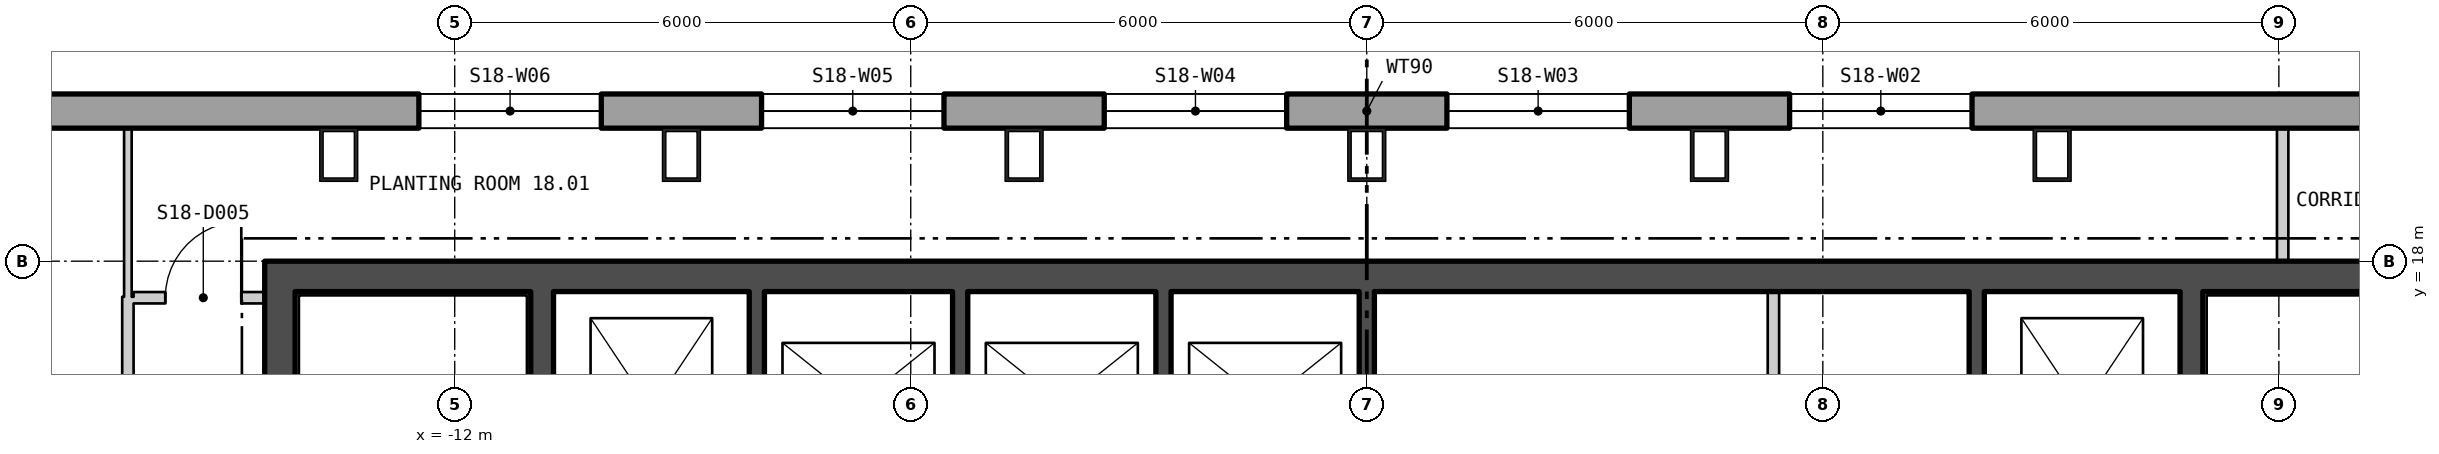
"""IFC4 building model, lengths in metres.
Left out: names, types, materials, properties, quantities, classifications, styles, units other than length and angle.
Written with IfcOpenShell. Run it as: python <this file> out.ifc"""

import sys

from ifc_helpers import new_model, si_unit, direction, frame, frame_2d, origin, origin_2d, place, context, subcontext, project, spatial, polyline, rectangle, hollow_rectangle, outline, extrude, element, fill, save


model = new_model("IFC4")
c1 = context("Model", 3, precision=1e-05, world=origin(), true_north=direction((0.0, 1.0)))
c2 = subcontext(c1, "Body", "Model", "MODEL_VIEW")
j1 = project(units=[si_unit("LENGTHUNIT", "METRE"), si_unit("PLANEANGLEUNIT", "RADIAN")], contexts=[c1])
p1 = place(None, origin())
s1 = spatial("IfcSite", under=j1, at=p1, CompositionType="ELEMENT")
p2 = place(p1, origin())
s2 = spatial("IfcBuilding", under=s1, at=p2, CompositionType="ELEMENT")
p3 = place(p2, frame((0.0, 0.0, 245.4)))
s3 = spatial("IfcBuildingStorey", under=s2, at=p3, CompositionType="ELEMENT", Elevation=245.4)
for number, where, z_axis, x_axis in (
    (1, (9.017, 19.4, 0.0), (0.0, 0.0, 1.0), (-1.0, 0.0, 0.0)),
    (2, (4.509, 19.4, 0.0), (0.0, 0.0, 1.0), (-1.0, 0.0, 0.0)),
    (3, (0.0, 19.4, 0.0), (0.0, 0.0, 1.0), (-1.0, 0.0, 0.0)),
    (4, (-4.509, 19.4, 0.0), (0.0, 0.0, 1.0), (-1.0, 0.0, 0.0)),
    (5, (-9.017, 19.4, 0.0), (0.0, 0.0, 1.0), (-1.0, 0.0, 0.0)),
    (6, (-13.526, 19.4, 0.0), (0.0, 0.0, 1.0), (-1.0, 0.0, 0.0)),
):
    element("IfcColumn", number, at=place(p3, frame(where, z_axis=z_axis, x_axis=x_axis)), inside=s3, PredefinedType="COLUMN", context=c2, shape_type="SweptSolid", body=[
        extrude(hollow_rectangle(XDim=0.5, YDim=0.7, WallThickness=0.045, at=origin_2d()), origin(), (0.0, 0.0, 1.0), 3.9),
    ])
p4 = place(p3, frame((22.875, 19.975, -0.4), z_axis=(0.0, 0.0, 1.0), x_axis=(-1.0, 0.0, 0.0)))
e7 = element("IfcWall", 7, at=p4, inside=s3, PredefinedType="SOLIDWALL", context=c2, shape_type="SweptSolid", body=[
    extrude(outline(polyline([(-0.13, -0.225), (45.88, -0.225), (45.62, 0.225), (0.13, 0.225), (-0.13, -0.225)])), origin(), (0.0, 0.0, 1.0), 3.9),
])
p5 = place(p4, frame((1.425, 0.0, 1.3)))
e8 = element("IfcOpeningElement", 8, at=p5, cuts=e7, PredefinedType="OPENING", context=c2, shape_type="SweptSolid", body=[
    extrude(rectangle(XDim=2.4, YDim=2.0, at=frame_2d((1.2, 1.0))), frame((0.0, 0.235, 0.0), z_axis=(0.0, -1.0, 0.0), x_axis=(1.0, 0.0, 0.0)), (0.0, 0.0, 1.0), 0.47),
])
p6 = place(p4, frame((14.912, 0.0, 1.3)))
e9 = element("IfcOpeningElement", 9, at=p6, cuts=e7, PredefinedType="OPENING", context=c2, shape_type="SweptSolid", body=[
    extrude(rectangle(XDim=2.4, YDim=2.0, at=frame_2d((1.2, 1.0))), frame((0.0, 0.235, 0.0), z_axis=(0.0, -1.0, 0.0), x_axis=(1.0, 0.0, 0.0)), (0.0, 0.0, 1.0), 0.47),
])
p7 = place(p4, frame((19.421, 0.0, 1.3)))
e10 = element("IfcOpeningElement", 10, at=p7, cuts=e7, PredefinedType="OPENING", context=c2, shape_type="SweptSolid", body=[
    extrude(rectangle(XDim=2.4, YDim=2.0, at=frame_2d((1.2, 1.0))), frame((0.0, 0.235, 0.0), z_axis=(0.0, -1.0, 0.0), x_axis=(1.0, 0.0, 0.0)), (0.0, 0.0, 1.0), 0.47),
])
p8 = place(p4, frame((23.929, 0.0, 1.3)))
e11 = element("IfcOpeningElement", 11, at=p8, cuts=e7, PredefinedType="OPENING", context=c2, shape_type="SweptSolid", body=[
    extrude(rectangle(XDim=2.4, YDim=2.0, at=frame_2d((1.2, 1.0))), frame((0.0, 0.235, 0.0), z_axis=(0.0, -1.0, 0.0), x_axis=(1.0, 0.0, 0.0)), (0.0, 0.0, 1.0), 0.47),
])
p9 = place(p4, frame((28.438, 0.0, 1.3)))
e12 = element("IfcOpeningElement", 12, at=p9, cuts=e7, PredefinedType="OPENING", context=c2, shape_type="SweptSolid", body=[
    extrude(rectangle(XDim=2.4, YDim=2.0, at=frame_2d((1.2, 1.0))), frame((0.0, 0.235, 0.0), z_axis=(0.0, -1.0, 0.0), x_axis=(1.0, 0.0, 0.0)), (0.0, 0.0, 1.0), 0.47),
])
p10 = place(p4, frame((32.947, 0.0, 1.3)))
e13 = element("IfcOpeningElement", 13, at=p10, cuts=e7, PredefinedType="OPENING", context=c2, shape_type="SweptSolid", body=[
    extrude(rectangle(XDim=2.4, YDim=2.0, at=frame_2d((1.2, 1.0))), frame((0.0, 0.235, 0.0), z_axis=(0.0, -1.0, 0.0), x_axis=(1.0, 0.0, 0.0)), (0.0, 0.0, 1.0), 0.47),
])
p11 = place(p4, frame((41.925, 0.0, 1.3)))
e14 = element("IfcOpeningElement", 14, at=p11, cuts=e7, PredefinedType="OPENING", context=c2, shape_type="SweptSolid", body=[
    extrude(rectangle(XDim=2.4, YDim=2.0, at=frame_2d((1.2, 1.0))), frame((0.0, 0.235, 0.0), z_axis=(0.0, -1.0, 0.0), x_axis=(1.0, 0.0, 0.0)), (0.0, 0.0, 1.0), 0.47),
])
p12 = place(p3, frame((-14.5, 17.8, 0.0), z_axis=(0.0, 0.0, 1.0), x_axis=(1.0, 0.0, 0.0)))
e15 = element("IfcWall", 15, at=p12, inside=s3, PredefinedType="SHEAR", context=c2, shape_type="SweptSolid", body=[
    extrude(rectangle(XDim=29.0, YDim=0.4, at=frame_2d((14.5, 0.0))), origin(), (0.0, 0.0, 1.0), 3.7),
])
p13 = place(p3, frame((-14.3, 4.4, 0.0), z_axis=(0.0, 0.0, 1.0), x_axis=(0.0, 1.0, 0.0)))
e16 = element("IfcWall", 16, at=p13, inside=s3, PredefinedType="SHEAR", context=c2, shape_type="SweptSolid", body=[
    extrude(rectangle(XDim=13.2, YDim=0.4, at=frame_2d((6.6, 0.0))), origin(), (0.0, 0.0, 1.0), 3.7),
])
p14 = place(p13, frame((3.05, 0.0, 0.0)))
e17 = element("IfcOpeningElement", 17, at=p14, cuts=e16, PredefinedType="OPENING", context=c2, shape_type="SweptSolid", body=[
    extrude(rectangle(XDim=1.5, YDim=2.1, at=frame_2d((0.75, 1.05))), frame((0.0, 0.21, 0.0), z_axis=(0.0, -1.0, 0.0), x_axis=(1.0, 0.0, 0.0)), (0.0, 0.0, 1.0), 0.42),
])
p15 = place(p3, frame((-10.85, 4.4, 0.0), z_axis=(0.0, 0.0, 1.0), x_axis=(0.0, 1.0, 0.0)))
e18 = element("IfcWall", 18, at=p15, inside=s3, PredefinedType="SHEAR", context=c2, shape_type="SweptSolid", body=[
    extrude(rectangle(XDim=13.2, YDim=0.3, at=frame_2d((6.6, 0.0))), origin(), (0.0, 0.0, 1.0), 3.7),
])
p16 = place(p15, frame((1.575, 0.0, 0.0)))
e19 = element("IfcOpeningElement", 19, at=p16, cuts=e18, PredefinedType="OPENING", context=c2, shape_type="SweptSolid", body=[
    extrude(rectangle(XDim=1.25, YDim=2.1, at=frame_2d((0.625, 1.05))), frame((0.0, 0.16, 0.0), z_axis=(0.0, -1.0, 0.0), x_axis=(1.0, 0.0, 0.0)), (0.0, 0.0, 1.0), 0.32),
])
p17 = place(p15, frame((0.4, 0.0, 0.0)))
e20 = element("IfcOpeningElement", 20, at=p17, cuts=e18, PredefinedType="OPENING", context=c2, shape_type="SweptSolid", body=[
    extrude(rectangle(XDim=0.9, YDim=2.1, at=frame_2d((0.45, 1.05))), frame((0.0, 0.16, 0.0), z_axis=(0.0, -1.0, 0.0), x_axis=(1.0, 0.0, 0.0)), (0.0, 0.0, 1.0), 0.32),
])
p18 = place(p3, frame((10.85, 4.4, 0.0), z_axis=(0.0, 0.0, 1.0), x_axis=(0.0, 1.0, 0.0)))
e21 = element("IfcWall", 21, at=p18, inside=s3, PredefinedType="SHEAR", context=c2, shape_type="SweptSolid", body=[
    extrude(rectangle(XDim=13.2, YDim=0.3, at=frame_2d((6.6, 0.0))), origin(), (0.0, 0.0, 1.0), 3.7),
])
p19 = place(p18, frame((1.575, 0.0, 0.0)))
e22 = element("IfcOpeningElement", 22, at=p19, cuts=e21, PredefinedType="OPENING", context=c2, shape_type="SweptSolid", body=[
    extrude(rectangle(XDim=1.25, YDim=2.1, at=frame_2d((0.625, 1.05))), frame((0.0, 0.16, 0.0), z_axis=(0.0, -1.0, 0.0), x_axis=(1.0, 0.0, 0.0)), (0.0, 0.0, 1.0), 0.32),
])
p20 = place(p18, frame((0.4, 0.0, 0.0)))
e23 = element("IfcOpeningElement", 23, at=p20, cuts=e21, PredefinedType="OPENING", context=c2, shape_type="SweptSolid", body=[
    extrude(rectangle(XDim=0.9, YDim=2.1, at=frame_2d((0.45, 1.05))), frame((0.0, 0.16, 0.0), z_axis=(0.0, -1.0, 0.0), x_axis=(1.0, 0.0, 0.0)), (0.0, 0.0, 1.0), 0.32),
])
for number, where, z_axis, x_axis in (
    (24, (-8.025, 14.7, 0.0), (0.0, 0.0, 1.0), (0.0, 1.0, 0.0)),
    (25, (-5.35, 14.7, 0.0), (0.0, 0.0, 1.0), (0.0, 1.0, 0.0)),
    (26, (-2.675, 14.7, 0.0), (0.0, 0.0, 1.0), (0.0, 1.0, 0.0)),
    (27, (0.0, 14.7, 0.0), (0.0, 0.0, 1.0), (0.0, 1.0, 0.0)),
):
    element("IfcWall", number, at=place(p3, frame(where, z_axis=z_axis, x_axis=x_axis)), inside=s3, PredefinedType="SHEAR", context=c2, shape_type="SweptSolid", body=[
        extrude(rectangle(XDim=2.9, YDim=0.2, at=frame_2d((1.45, 0.0))), origin(), (0.0, 0.0, 1.0), 3.7),
    ])
p21 = place(p3, frame((5.35, 14.7, 0.0), z_axis=(0.0, 0.0, 1.0), x_axis=(0.0, 1.0, 0.0)))
e28 = element("IfcWall", 28, at=p21, inside=s3, PredefinedType="PARTITIONING", context=c2, shape_type="SweptSolid", body=[
    extrude(rectangle(XDim=2.9, YDim=0.15, at=frame_2d((1.45, 0.0))), origin(), (0.0, 0.0, 1.0), 3.7),
])
p22 = place(p3, frame((8.025, 14.7, 0.0), z_axis=(0.0, 0.0, 1.0), x_axis=(0.0, 1.0, 0.0)))
e29 = element("IfcWall", 29, at=p22, inside=s3, PredefinedType="SHEAR", context=c2, shape_type="SweptSolid", body=[
    extrude(rectangle(XDim=2.9, YDim=0.2, at=frame_2d((1.45, 0.0))), origin(), (0.0, 0.0, 1.0), 3.7),
])
p23 = place(p3, frame((-16.3, 2.125, 0.0), z_axis=(0.0, 0.0, 1.0), x_axis=(0.0, 1.0, 0.0)))
e30 = element("IfcWall", 30, at=p23, inside=s3, PredefinedType="PARTITIONING", context=c2, shape_type="SweptSolid", body=[
    extrude(rectangle(XDim=15.406, YDim=0.15, at=frame_2d((7.703, 0.0))), origin(), (0.0, 0.0, 1.0), 3.7),
])
p24 = place(p23, frame((2.576, 0.0, 0.0)))
e31 = element("IfcOpeningElement", 31, at=p24, cuts=e30, PredefinedType="OPENING", context=c2, shape_type="SweptSolid", body=[
    extrude(rectangle(XDim=1.0, YDim=2.1, at=frame_2d((0.5, 1.05))), frame((0.0, 0.085, 0.0), z_axis=(0.0, -1.0, 0.0), x_axis=(1.0, 0.0, 0.0)), (0.0, 0.0, 1.0), 0.17),
])
p25 = place(p23, frame((5.24, 0.0, 0.0)))
e32 = element("IfcOpeningElement", 32, at=p25, cuts=e30, PredefinedType="OPENING", context=c2, shape_type="SweptSolid", body=[
    extrude(rectangle(XDim=1.0, YDim=2.1, at=frame_2d((0.5, 1.05))), frame((0.0, 0.085, 0.0), z_axis=(0.0, -1.0, 0.0), x_axis=(1.0, 0.0, 0.0)), (0.0, 0.0, 1.0), 0.17),
])
p26 = place(p23, frame((8.602, 0.0, 0.0)))
e33 = element("IfcOpeningElement", 33, at=p26, cuts=e30, PredefinedType="OPENING", context=c2, shape_type="SweptSolid", body=[
    extrude(rectangle(XDim=1.0, YDim=2.1, at=frame_2d((0.5, 1.05))), frame((0.0, 0.085, 0.0), z_axis=(0.0, -1.0, 0.0), x_axis=(1.0, 0.0, 0.0)), (0.0, 0.0, 1.0), 0.17),
])
p27 = place(p23, frame((12.438, 0.0, 0.0)))
e34 = element("IfcOpeningElement", 34, at=p27, cuts=e30, PredefinedType="OPENING", context=c2, shape_type="SweptSolid", body=[
    extrude(rectangle(XDim=1.0, YDim=2.1, at=frame_2d((0.5, 1.05))), frame((0.0, 0.085, 0.0), z_axis=(0.0, -1.0, 0.0), x_axis=(1.0, 0.0, 0.0)), (0.0, 0.0, 1.0), 0.17),
])
p28 = place(p3, frame((-16.3, 17.531, 0.0), z_axis=(0.0, 0.0, 1.0), x_axis=(0.0, 1.0, 0.0)))
e35 = element("IfcWall", 35, at=p28, inside=s3, PredefinedType="PARTITIONING", context=c2, shape_type="SweptSolid", body=[
    extrude(rectangle(XDim=2.219, YDim=0.1, at=frame_2d((1.109, 0.0))), origin(), (0.0, 0.0, 1.0), 3.7),
])
p29 = place(p3, frame((-16.225, 17.519, 0.0), z_axis=(0.0, 0.0, 1.0), x_axis=(1.0, 0.0, 0.0)))
e36 = element("IfcWall", 36, at=p29, inside=s3, PredefinedType="PARTITIONING", context=c2, shape_type="SweptSolid", body=[
    extrude(rectangle(XDim=1.725, YDim=0.15, at=frame_2d((0.863, 0.0))), origin(), (0.0, 0.0, 1.0), 3.7),
])
p30 = place(p29, frame((0.417, 0.0, 0.0)))
e37 = element("IfcOpeningElement", 37, at=p30, cuts=e36, PredefinedType="OPENING", context=c2, shape_type="SweptSolid", body=[
    extrude(rectangle(XDim=1.0, YDim=2.1, at=frame_2d((0.5, 1.05))), frame((0.0, 0.085, 0.0), z_axis=(0.0, -1.0, 0.0), x_axis=(1.0, 0.0, 0.0)), (0.0, 0.0, 1.0), 0.17),
])
p31 = place(p3, frame((12.05, 18.0, 0.0), z_axis=(0.0, 0.0, 1.0), x_axis=(0.0, 1.0, 0.0)))
e38 = element("IfcWall", 38, at=p31, inside=s3, PredefinedType="PARTITIONING", context=c2, shape_type="SweptSolid", body=[
    extrude(rectangle(XDim=1.75, YDim=0.15, at=frame_2d((0.875, 0.0))), origin(), (0.0, 0.0, 1.0), 3.7),
])
p32 = place(p6, origin())
e39 = element("IfcWindow", 39, at=p32, inside=s3, PartitioningType="SINGLE_PANEL", PredefinedType="WINDOW", context=c2, shape_type="SweptSolid", body=[
    extrude(rectangle(XDim=2.4, YDim=2.0, at=frame_2d((1.2, 1.0))), frame((0.0, 0.105, 0.0), z_axis=(0.0, -1.0, 0.0), x_axis=(1.0, 0.0, 0.0)), (0.0, 0.0, 1.0), 0.06),
])
fill(e9, e39)
p33 = place(p7, origin())
e40 = element("IfcWindow", 40, at=p33, inside=s3, PartitioningType="SINGLE_PANEL", PredefinedType="WINDOW", context=c2, shape_type="SweptSolid", body=[
    extrude(rectangle(XDim=2.4, YDim=2.0, at=frame_2d((1.2, 1.0))), frame((0.0, 0.105, 0.0), z_axis=(0.0, -1.0, 0.0), x_axis=(1.0, 0.0, 0.0)), (0.0, 0.0, 1.0), 0.06),
])
fill(e10, e40)
p34 = place(p8, origin())
e41 = element("IfcWindow", 41, at=p34, inside=s3, PartitioningType="SINGLE_PANEL", PredefinedType="WINDOW", context=c2, shape_type="SweptSolid", body=[
    extrude(rectangle(XDim=2.4, YDim=2.0, at=frame_2d((1.2, 1.0))), frame((0.0, 0.105, 0.0), z_axis=(0.0, -1.0, 0.0), x_axis=(1.0, 0.0, 0.0)), (0.0, 0.0, 1.0), 0.06),
])
fill(e11, e41)
p35 = place(p9, origin())
e42 = element("IfcWindow", 42, at=p35, inside=s3, PartitioningType="SINGLE_PANEL", PredefinedType="WINDOW", context=c2, shape_type="SweptSolid", body=[
    extrude(rectangle(XDim=2.4, YDim=2.0, at=frame_2d((1.2, 1.0))), frame((0.0, 0.105, 0.0), z_axis=(0.0, -1.0, 0.0), x_axis=(1.0, 0.0, 0.0)), (0.0, 0.0, 1.0), 0.06),
])
fill(e12, e42)
p36 = place(p10, origin())
e43 = element("IfcWindow", 43, at=p36, inside=s3, PartitioningType="SINGLE_PANEL", PredefinedType="WINDOW", context=c2, shape_type="SweptSolid", body=[
    extrude(rectangle(XDim=2.4, YDim=2.0, at=frame_2d((1.2, 1.0))), frame((0.0, 0.105, 0.0), z_axis=(0.0, -1.0, 0.0), x_axis=(1.0, 0.0, 0.0)), (0.0, 0.0, 1.0), 0.06),
])
fill(e13, e43)
p37 = place(p30, origin())
e44 = element("IfcDoor", 44, at=p37, inside=s3, OperationType="SINGLE_SWING_LEFT", PredefinedType="DOOR", context=c2, shape_type="SweptSolid", body=[
    extrude(rectangle(XDim=1.0, YDim=2.1, at=frame_2d((0.5, 1.05))), frame((0.0, 0.025, 0.0), z_axis=(0.0, -1.0, 0.0), x_axis=(1.0, 0.0, 0.0)), (0.0, 0.0, 1.0), 0.05),
])
fill(e37, e44)
save(model, sys.argv[1])
